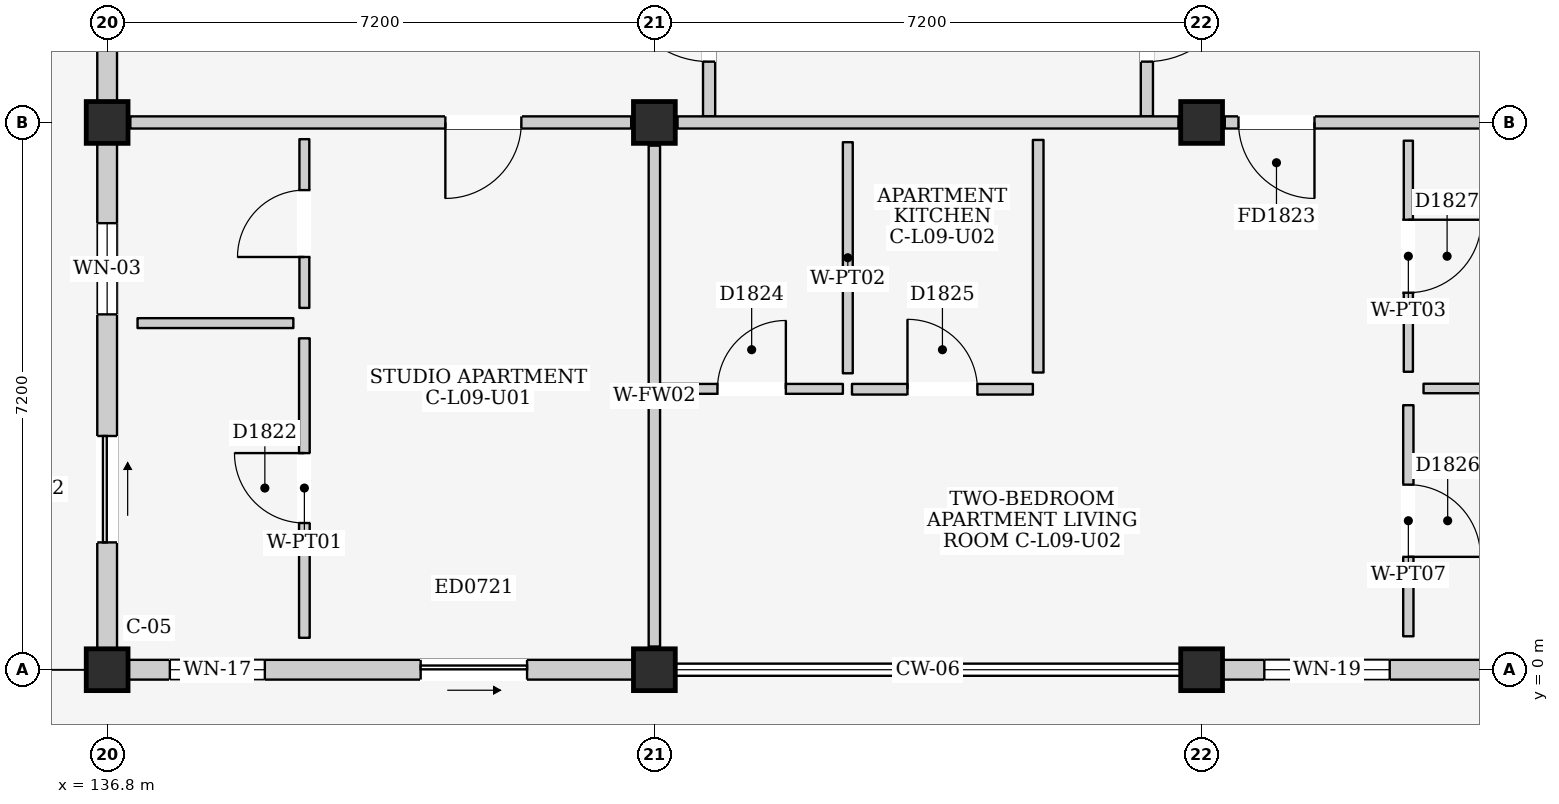
"""IFC4 building model, lengths in metres.
Left out: names, types, materials, properties, quantities, classifications, styles, units other than length and angle.
Written with IfcOpenShell. Run it as: python <this file> out.ifc"""

import sys

from ifc_helpers import new_model, si_unit, direction, frame, frame_2d, origin, origin_2d, place, context, subcontext, project, spatial, rectangle, extrude, element, fill, save


model = new_model("IFC4")
c1 = context("Model", 3, precision=1e-05, world=origin(), true_north=direction((0.0, 1.0)))
c2 = subcontext(c1, "Body", "Model", "MODEL_VIEW")
j1 = project(units=[si_unit("LENGTHUNIT", "METRE"), si_unit("PLANEANGLEUNIT", "RADIAN")], contexts=[c1])
p1 = place(None, origin())
s1 = spatial("IfcSite", under=j1, at=p1, CompositionType="ELEMENT")
p2 = place(p1, origin())
s2 = spatial("IfcBuilding", under=s1, at=p2, CompositionType="ELEMENT")
p3 = place(p2, frame((0.0, 0.0, 31.5)))
s3 = spatial("IfcBuildingStorey", under=s2, at=p3, CompositionType="ELEMENT", Elevation=31.5)
for number, where, z_axis, x_axis in (
    (1, (136.8, 0.0, 0.0), (0.0, 0.0, 1.0), (1.0, 0.0, 0.0)),
    (2, (136.8, 7.2, 0.0), (0.0, 0.0, 1.0), (1.0, 0.0, 0.0)),
    (3, (144.0, 0.0, 0.0), (0.0, 0.0, 1.0), (1.0, 0.0, 0.0)),
    (4, (144.0, 7.2, 0.0), (0.0, 0.0, 1.0), (1.0, 0.0, 0.0)),
    (5, (151.2, 0.0, 0.0), (0.0, 0.0, 1.0), (1.0, 0.0, 0.0)),
    (6, (151.2, 7.2, 0.0), (0.0, 0.0, 1.0), (1.0, 0.0, 0.0)),
):
    element("IfcColumn", number, at=place(p3, frame(where, z_axis=z_axis, x_axis=x_axis)), inside=s3, PredefinedType="COLUMN", context=c2, shape_type="SweptSolid", body=[
        extrude(rectangle(XDim=0.55, YDim=0.55, at=origin_2d()), origin(), (0.0, 0.0, 1.0), 3.3),
    ])
p4 = place(p3, frame((137.075, 0.0, 0.0), z_axis=(0.0, 0.0, 1.0), x_axis=(1.0, 0.0, 0.0)))
e7 = element("IfcWall", 7, at=p4, inside=s3, PredefinedType="ELEMENTEDWALL", context=c2, shape_type="SweptSolid", body=[
    extrude(rectangle(XDim=6.65, YDim=0.26, at=frame_2d((3.325, 0.0))), origin(), (0.0, 0.0, 1.0), 2.615),
])
p5 = place(p4, frame((3.85, 0.0, 0.0)))
e8 = element("IfcOpeningElement", 8, at=p5, cuts=e7, PredefinedType="OPENING", context=c2, shape_type="SweptSolid", body=[
    extrude(rectangle(XDim=1.4, YDim=2.1, at=frame_2d((0.7, 1.05))), frame((0.0, 0.145, 0.0), z_axis=(0.0, -1.0, 0.0), x_axis=(1.0, 0.0, 0.0)), (0.0, 0.0, 1.0), 0.29),
])
p6 = place(p4, frame((0.55, 0.0, 0.9)))
e9 = element("IfcOpeningElement", 9, at=p6, cuts=e7, PredefinedType="OPENING", context=c2, shape_type="SweptSolid", body=[
    extrude(rectangle(XDim=1.25, YDim=1.3, at=frame_2d((0.625, 0.65))), frame((0.0, 0.145, 0.0), z_axis=(0.0, -1.0, 0.0), x_axis=(1.0, 0.0, 0.0)), (0.0, 0.0, 1.0), 0.29),
])
p7 = place(p3, frame((136.8, 0.275, 0.0), z_axis=(0.0, 0.0, 1.0), x_axis=(0.0, 1.0, 0.0)))
e10 = element("IfcWall", 10, at=p7, inside=s3, PredefinedType="ELEMENTEDWALL", context=c2, shape_type="SweptSolid", body=[
    extrude(rectangle(XDim=6.65, YDim=0.26, at=frame_2d((3.325, 0.0))), origin(), (0.0, 0.0, 1.0), 2.565),
])
p8 = place(p7, frame((1.4, 0.0, 0.0)))
e11 = element("IfcOpeningElement", 11, at=p8, cuts=e10, PredefinedType="OPENING", context=c2, shape_type="SweptSolid", body=[
    extrude(rectangle(XDim=1.4, YDim=2.1, at=frame_2d((0.7, 1.05))), frame((0.0, 0.145, 0.0), z_axis=(0.0, -1.0, 0.0), x_axis=(1.0, 0.0, 0.0)), (0.0, 0.0, 1.0), 0.29),
])
p9 = place(p7, frame((4.4, 0.0, 0.95)))
e12 = element("IfcOpeningElement", 12, at=p9, cuts=e10, PredefinedType="OPENING", context=c2, shape_type="SweptSolid", body=[
    extrude(rectangle(XDim=1.2, YDim=1.35, at=frame_2d((0.6, 0.675))), frame((0.0, 0.145, 0.0), z_axis=(0.0, -1.0, 0.0), x_axis=(1.0, 0.0, 0.0)), (0.0, 0.0, 1.0), 0.29),
])
p10 = place(p3, frame((136.8, 7.475, 0.0), z_axis=(0.0, 0.0, 1.0), x_axis=(0.0, 1.0, 0.0)))
e13 = element("IfcWall", 13, at=p10, inside=s3, PredefinedType="ELEMENTEDWALL", context=c2, shape_type="SweptSolid", body=[
    extrude(rectangle(XDim=6.65, YDim=0.26, at=frame_2d((3.325, 0.0))), origin(), (0.0, 0.0, 1.0), 2.565),
])
p11 = place(p10, frame((4.2, 0.0, 1.2)))
e14 = element("IfcOpeningElement", 14, at=p11, cuts=e13, PredefinedType="OPENING", context=c2, shape_type="SweptSolid", body=[
    extrude(rectangle(XDim=1.0, YDim=0.9, at=frame_2d((0.5, 0.45))), frame((0.0, 0.145, 0.0), z_axis=(0.0, -1.0, 0.0), x_axis=(1.0, 0.0, 0.0)), (0.0, 0.0, 1.0), 0.29),
])
p12 = place(p3, frame((151.475, 0.0, 0.0), z_axis=(0.0, 0.0, 1.0), x_axis=(1.0, 0.0, 0.0)))
e15 = element("IfcWall", 15, at=p12, inside=s3, PredefinedType="ELEMENTEDWALL", context=c2, shape_type="SweptSolid", body=[
    extrude(rectangle(XDim=6.65, YDim=0.26, at=frame_2d((3.325, 0.0))), origin(), (0.0, 0.0, 1.0), 2.615),
])
p13 = place(p12, frame((3.85, 0.0, 0.0)))
e16 = element("IfcOpeningElement", 16, at=p13, cuts=e15, PredefinedType="OPENING", context=c2, shape_type="SweptSolid", body=[
    extrude(rectangle(XDim=1.6, YDim=2.12, at=frame_2d((0.8, 1.06))), frame((0.0, 0.145, 0.0), z_axis=(0.0, -1.0, 0.0), x_axis=(1.0, 0.0, 0.0)), (0.0, 0.0, 1.0), 0.29),
])
p14 = place(p12, frame((0.55, 0.0, 0.9)))
e17 = element("IfcOpeningElement", 17, at=p14, cuts=e15, PredefinedType="OPENING", context=c2, shape_type="SweptSolid", body=[
    extrude(rectangle(XDim=1.65, YDim=1.35, at=frame_2d((0.825, 0.675))), frame((0.0, 0.145, 0.0), z_axis=(0.0, -1.0, 0.0), x_axis=(1.0, 0.0, 0.0)), (0.0, 0.0, 1.0), 0.29),
])
p15 = place(p3, frame((144.72, 7.28, 0.0), z_axis=(0.0, 0.0, 1.0), x_axis=(0.0, 1.0, 0.0)))
e18 = element("IfcWall", 18, at=p15, inside=s3, PredefinedType="PARTITIONING", context=c2, shape_type="SweptSolid", body=[
    extrude(rectangle(XDim=4.32, YDim=0.16, at=frame_2d((2.16, 0.0))), origin(), (0.0, 0.0, 1.0), 3.08),
])
p16 = place(p15, frame((0.72, 0.0, 0.0)))
e19 = element("IfcOpeningElement", 19, at=p16, cuts=e18, PredefinedType="OPENING", context=c2, shape_type="SweptSolid", body=[
    extrude(rectangle(XDim=1.2, YDim=2.2, at=frame_2d((0.6, 1.1))), frame((0.0, 0.095, 0.0), z_axis=(0.0, -1.0, 0.0), x_axis=(1.0, 0.0, 0.0)), (0.0, 0.0, 1.0), 0.19),
])
p17 = place(p3, frame((150.48, 7.28, 0.0), z_axis=(0.0, 0.0, 1.0), x_axis=(0.0, 1.0, 0.0)))
e20 = element("IfcWall", 20, at=p17, inside=s3, PredefinedType="PARTITIONING", context=c2, shape_type="SweptSolid", body=[
    extrude(rectangle(XDim=4.32, YDim=0.16, at=frame_2d((2.16, 0.0))), origin(), (0.0, 0.0, 1.0), 3.08),
])
p18 = place(p17, frame((0.72, 0.0, 0.0)))
e21 = element("IfcOpeningElement", 21, at=p18, cuts=e20, PredefinedType="OPENING", context=c2, shape_type="SweptSolid", body=[
    extrude(rectangle(XDim=1.2, YDim=2.2, at=frame_2d((0.6, 1.1))), frame((0.0, 0.095, 0.0), z_axis=(0.0, -1.0, 0.0), x_axis=(1.0, 0.0, 0.0)), (0.0, 0.0, 1.0), 0.19),
])
p19 = place(p3, frame((137.105, 7.2, 0.0), z_axis=(0.0, 0.0, 1.0), x_axis=(1.0, 0.0, 0.0)))
e22 = element("IfcWall", 22, at=p19, inside=s3, PredefinedType="PARTITIONING", context=c2, shape_type="SweptSolid", body=[
    extrude(rectangle(XDim=6.59, YDim=0.16, at=frame_2d((3.295, 0.0))), origin(), (0.0, 0.0, 1.0), 2.465),
])
p20 = place(p19, frame((4.145, 0.0, 0.0)))
e23 = element("IfcOpeningElement", 23, at=p20, cuts=e22, PredefinedType="OPENING", context=c2, shape_type="SweptSolid", body=[
    extrude(rectangle(XDim=1.0, YDim=2.15, at=frame_2d((0.5, 1.075))), frame((0.0, 0.095, 0.0), z_axis=(0.0, -1.0, 0.0), x_axis=(1.0, 0.0, 0.0)), (0.0, 0.0, 1.0), 0.19),
])
p21 = place(p3, frame((144.0, 0.305, 0.0), z_axis=(0.0, 0.0, 1.0), x_axis=(0.0, 1.0, 0.0)))
e24 = element("IfcWall", 24, at=p21, inside=s3, PredefinedType="PARTITIONING", context=c2, shape_type="SweptSolid", body=[
    extrude(rectangle(XDim=6.59, YDim=0.15, at=frame_2d((3.295, 0.0))), origin(), (0.0, 0.0, 1.0), 2.565),
])
p22 = place(p3, frame((137.2, 4.56, 0.0), z_axis=(0.0, 0.0, 1.0), x_axis=(1.0, 0.0, 0.0)))
e25 = element("IfcWall", 25, at=p22, inside=s3, PredefinedType="PARTITIONING", context=c2, shape_type="SweptSolid", body=[
    extrude(rectangle(XDim=2.05, YDim=0.13, at=frame_2d((1.025, 0.0))), origin(), (0.0, 0.0, 1.0), 3.08),
])
p23 = place(p3, frame((139.395, 4.76, 0.0), z_axis=(0.0, 0.0, 1.0), x_axis=(0.0, 1.0, 0.0)))
e26 = element("IfcWall", 26, at=p23, inside=s3, PredefinedType="PARTITIONING", context=c2, shape_type="SweptSolid", body=[
    extrude(rectangle(XDim=2.22, YDim=0.13, at=frame_2d((1.11, 0.0))), origin(), (0.0, 0.0, 1.0), 3.08),
])
p24 = place(p23, frame((0.67, 0.0, 0.0)))
e27 = element("IfcOpeningElement", 27, at=p24, cuts=e26, PredefinedType="OPENING", context=c2, shape_type="SweptSolid", body=[
    extrude(rectangle(XDim=0.88, YDim=2.1, at=frame_2d((0.44, 1.05))), frame((0.0, 0.08, 0.0), z_axis=(0.0, -1.0, 0.0), x_axis=(1.0, 0.0, 0.0)), (0.0, 0.0, 1.0), 0.16),
])
p25 = place(p3, frame((139.395, 0.42, 0.0), z_axis=(0.0, 0.0, 1.0), x_axis=(0.0, 1.0, 0.0)))
e28 = element("IfcWall", 28, at=p25, inside=s3, PredefinedType="PARTITIONING", context=c2, shape_type="SweptSolid", body=[
    extrude(rectangle(XDim=3.94, YDim=0.14, at=frame_2d((1.97, 0.0))), origin(), (0.0, 0.0, 1.0), 3.08),
])
p26 = place(p25, frame((1.51, 0.0, 0.0)))
e29 = element("IfcOpeningElement", 29, at=p26, cuts=e28, PredefinedType="OPENING", context=c2, shape_type="SweptSolid", body=[
    extrude(rectangle(XDim=0.92, YDim=2.1, at=frame_2d((0.46, 1.05))), frame((0.0, 0.085, 0.0), z_axis=(0.0, -1.0, 0.0), x_axis=(1.0, 0.0, 0.0)), (0.0, 0.0, 1.0), 0.17),
])
p27 = place(p3, frame((144.305, 7.2, 0.0), z_axis=(0.0, 0.0, 1.0), x_axis=(1.0, 0.0, 0.0)))
e30 = element("IfcWall", 30, at=p27, inside=s3, PredefinedType="PARTITIONING", context=c2, shape_type="SweptSolid", body=[
    extrude(rectangle(XDim=6.59, YDim=0.16, at=frame_2d((3.295, 0.0))), origin(), (0.0, 0.0, 1.0), 2.465),
])
p28 = place(p3, frame((151.505, 7.2, 0.0), z_axis=(0.0, 0.0, 1.0), x_axis=(1.0, 0.0, 0.0)))
e31 = element("IfcWall", 31, at=p28, inside=s3, PredefinedType="PARTITIONING", context=c2, shape_type="SweptSolid", body=[
    extrude(rectangle(XDim=6.59, YDim=0.16, at=frame_2d((3.295, 0.0))), origin(), (0.0, 0.0, 1.0), 2.465),
])
p29 = place(p28, frame((0.18, 0.0, 0.0)))
e32 = element("IfcOpeningElement", 32, at=p29, cuts=e31, PredefinedType="OPENING", context=c2, shape_type="SweptSolid", body=[
    extrude(rectangle(XDim=1.0, YDim=2.15, at=frame_2d((0.5, 1.075))), frame((0.0, 0.095, 0.0), z_axis=(0.0, -1.0, 0.0), x_axis=(1.0, 0.0, 0.0)), (0.0, 0.0, 1.0), 0.19),
])
p30 = place(p3, frame((144.08, 3.695, 0.0), z_axis=(0.0, 0.0, 1.0), x_axis=(1.0, 0.0, 0.0)))
e33 = element("IfcWall", 33, at=p30, inside=s3, PredefinedType="PARTITIONING", context=c2, shape_type="SweptSolid", body=[
    extrude(rectangle(XDim=2.4, YDim=0.13, at=frame_2d((1.2, 0.0))), origin(), (0.0, 0.0, 1.0), 3.08),
])
p31 = place(p30, frame((0.75, 0.0, 0.0)))
e34 = element("IfcOpeningElement", 34, at=p31, cuts=e33, PredefinedType="OPENING", context=c2, shape_type="SweptSolid", body=[
    extrude(rectangle(XDim=0.9, YDim=2.1, at=frame_2d((0.45, 1.05))), frame((0.0, 0.08, 0.0), z_axis=(0.0, -1.0, 0.0), x_axis=(1.0, 0.0, 0.0)), (0.0, 0.0, 1.0), 0.16),
])
p32 = place(p3, frame((146.545, 3.9, 0.0), z_axis=(0.0, 0.0, 1.0), x_axis=(0.0, 1.0, 0.0)))
e35 = element("IfcWall", 35, at=p32, inside=s3, PredefinedType="PARTITIONING", context=c2, shape_type="SweptSolid", body=[
    extrude(rectangle(XDim=3.04, YDim=0.13, at=frame_2d((1.52, 0.0))), origin(), (0.0, 0.0, 1.0), 3.08),
])
p33 = place(p3, frame((146.6, 3.69, 0.0), z_axis=(0.0, 0.0, 1.0), x_axis=(1.0, 0.0, 0.0)))
e36 = element("IfcWall", 36, at=p33, inside=s3, PredefinedType="PARTITIONING", context=c2, shape_type="SweptSolid", body=[
    extrude(rectangle(XDim=2.38, YDim=0.14, at=frame_2d((1.19, 0.0))), origin(), (0.0, 0.0, 1.0), 3.08),
])
p34 = place(p33, frame((0.73, 0.0, 0.0)))
e37 = element("IfcOpeningElement", 37, at=p34, cuts=e36, PredefinedType="OPENING", context=c2, shape_type="SweptSolid", body=[
    extrude(rectangle(XDim=0.92, YDim=2.1, at=frame_2d((0.46, 1.05))), frame((0.0, 0.085, 0.0), z_axis=(0.0, -1.0, 0.0), x_axis=(1.0, 0.0, 0.0)), (0.0, 0.0, 1.0), 0.17),
])
p35 = place(p3, frame((149.05, 3.91, 0.0), z_axis=(0.0, 0.0, 1.0), x_axis=(0.0, 1.0, 0.0)))
e38 = element("IfcWall", 38, at=p35, inside=s3, PredefinedType="PARTITIONING", context=c2, shape_type="SweptSolid", body=[
    extrude(rectangle(XDim=3.06, YDim=0.14, at=frame_2d((1.53, 0.0))), origin(), (0.0, 0.0, 1.0), 3.08),
])
p36 = place(p3, frame((153.92, 0.44, 0.0), z_axis=(0.0, 0.0, 1.0), x_axis=(0.0, 1.0, 0.0)))
e39 = element("IfcWall", 39, at=p36, inside=s3, PredefinedType="PARTITIONING", context=c2, shape_type="SweptSolid", body=[
    extrude(rectangle(XDim=3.04, YDim=0.135, at=frame_2d((1.52, 0.0))), origin(), (0.0, 0.0, 1.0), 3.08),
])
p37 = place(p36, frame((1.045, 0.0, 0.0)))
e40 = element("IfcOpeningElement", 40, at=p37, cuts=e39, PredefinedType="OPENING", context=c2, shape_type="SweptSolid", body=[
    extrude(rectangle(XDim=0.95, YDim=2.15, at=frame_2d((0.475, 1.075))), frame((0.0, 0.083, 0.0), z_axis=(0.0, -1.0, 0.0), x_axis=(1.0, 0.0, 0.0)), (0.0, 0.0, 1.0), 0.165),
])
p38 = place(p3, frame((154.12, 3.7, 0.0), z_axis=(0.0, 0.0, 1.0), x_axis=(1.0, 0.0, 0.0)))
e41 = element("IfcWall", 41, at=p38, inside=s3, PredefinedType="PARTITIONING", context=c2, shape_type="SweptSolid", body=[
    extrude(rectangle(XDim=4.06, YDim=0.125, at=frame_2d((2.03, 0.0))), origin(), (0.0, 0.0, 1.0), 3.08),
])
p39 = place(p3, frame((153.92, 3.92, 0.0), z_axis=(0.0, 0.0, 1.0), x_axis=(0.0, 1.0, 0.0)))
e42 = element("IfcWall", 42, at=p39, inside=s3, PredefinedType="PARTITIONING", context=c2, shape_type="SweptSolid", body=[
    extrude(rectangle(XDim=3.04, YDim=0.12, at=frame_2d((1.52, 0.0))), origin(), (0.0, 0.0, 1.0), 3.08),
])
p40 = place(p39, frame((1.04, 0.0, 0.0)))
e43 = element("IfcOpeningElement", 43, at=p40, cuts=e42, PredefinedType="OPENING", context=c2, shape_type="SweptSolid", body=[
    extrude(rectangle(XDim=0.96, YDim=2.15, at=frame_2d((0.48, 1.075))), frame((0.0, 0.075, 0.0), z_axis=(0.0, -1.0, 0.0), x_axis=(1.0, 0.0, 0.0)), (0.0, 0.0, 1.0), 0.15),
])
p41 = place(p5, frame((1.4, 0.0, 0.0), z_axis=(0.0, 0.0, 1.0), x_axis=(-1.0, 0.0, 0.0)))
e44 = element("IfcDoor", 44, at=p41, inside=s3, OperationType="SLIDING_TO_RIGHT", PredefinedType="DOOR", context=c2, shape_type="SweptSolid", body=[
    extrude(rectangle(XDim=1.4, YDim=2.1, at=frame_2d((0.7, 1.05))), frame((0.0, 0.025, 0.0), z_axis=(0.0, -1.0, 0.0), x_axis=(1.0, 0.0, 0.0)), (0.0, 0.0, 1.0), 0.05),
])
fill(e8, e44)
p42 = place(p6, origin())
e45 = element("IfcWindow", 45, at=p42, inside=s3, PartitioningType="SINGLE_PANEL", PredefinedType="WINDOW", context=c2, shape_type="SweptSolid", body=[
    extrude(rectangle(XDim=1.25, YDim=1.3, at=frame_2d((0.625, 0.65))), frame((0.0, 0.03, 0.0), z_axis=(0.0, -1.0, 0.0), x_axis=(1.0, 0.0, 0.0)), (0.0, 0.0, 1.0), 0.06),
])
fill(e9, e45)
p43 = place(p8, frame((1.4, 0.0, 0.0), z_axis=(0.0, 0.0, 1.0), x_axis=(-1.0, 0.0, 0.0)))
e46 = element("IfcDoor", 46, at=p43, inside=s3, OperationType="SLIDING_TO_RIGHT", PredefinedType="DOOR", context=c2, shape_type="SweptSolid", body=[
    extrude(rectangle(XDim=1.4, YDim=2.1, at=frame_2d((0.7, 1.05))), frame((0.0, 0.025, 0.0), z_axis=(0.0, -1.0, 0.0), x_axis=(1.0, 0.0, 0.0)), (0.0, 0.0, 1.0), 0.05),
])
fill(e11, e46)
p44 = place(p9, origin())
e47 = element("IfcWindow", 47, at=p44, inside=s3, PartitioningType="SINGLE_PANEL", PredefinedType="WINDOW", context=c2, shape_type="SweptSolid", body=[
    extrude(rectangle(XDim=1.2, YDim=1.35, at=frame_2d((0.6, 0.675))), frame((0.0, 0.03, 0.0), z_axis=(0.0, -1.0, 0.0), x_axis=(1.0, 0.0, 0.0)), (0.0, 0.0, 1.0), 0.06),
])
fill(e12, e47)
p45 = place(p14, origin())
e48 = element("IfcWindow", 48, at=p45, inside=s3, PartitioningType="DOUBLE_PANEL_VERTICAL", PredefinedType="WINDOW", context=c2, shape_type="SweptSolid", body=[
    extrude(rectangle(XDim=1.65, YDim=1.35, at=frame_2d((0.825, 0.675))), frame((0.0, 0.03, 0.0), z_axis=(0.0, -1.0, 0.0), x_axis=(1.0, 0.0, 0.0)), (0.0, 0.0, 1.0), 0.06),
])
fill(e17, e48)
p46 = place(p16, origin())
e49 = element("IfcDoor", 49, at=p46, inside=s3, OperationType="SINGLE_SWING_RIGHT", PredefinedType="DOOR", context=c2, shape_type="SweptSolid", body=[
    extrude(rectangle(XDim=1.2, YDim=2.2, at=frame_2d((0.6, 1.1))), frame((0.0, 0.025, 0.0), z_axis=(0.0, -1.0, 0.0), x_axis=(1.0, 0.0, 0.0)), (0.0, 0.0, 1.0), 0.05),
])
fill(e19, e49)
p47 = place(p18, frame((1.2, 0.0, 0.0), z_axis=(0.0, 0.0, 1.0), x_axis=(-1.0, 0.0, 0.0)))
e50 = element("IfcDoor", 50, at=p47, inside=s3, OperationType="SINGLE_SWING_LEFT", PredefinedType="DOOR", context=c2, shape_type="SweptSolid", body=[
    extrude(rectangle(XDim=1.2, YDim=2.2, at=frame_2d((0.6, 1.1))), frame((0.0, 0.025, 0.0), z_axis=(0.0, -1.0, 0.0), x_axis=(1.0, 0.0, 0.0)), (0.0, 0.0, 1.0), 0.05),
])
fill(e21, e50)
p48 = place(p20, frame((1.0, 0.0, 0.0), z_axis=(0.0, 0.0, 1.0), x_axis=(-1.0, 0.0, 0.0)))
e51 = element("IfcDoor", 51, at=p48, inside=s3, OperationType="SINGLE_SWING_RIGHT", PredefinedType="DOOR", context=c2, shape_type="SweptSolid", body=[
    extrude(rectangle(XDim=1.0, YDim=2.15, at=frame_2d((0.5, 1.075))), frame((0.0, 0.025, 0.0), z_axis=(0.0, -1.0, 0.0), x_axis=(1.0, 0.0, 0.0)), (0.0, 0.0, 1.0), 0.05),
])
fill(e23, e51)
p49 = place(p24, origin())
e52 = element("IfcDoor", 52, at=p49, inside=s3, OperationType="SINGLE_SWING_LEFT", PredefinedType="DOOR", context=c2, shape_type="SweptSolid", body=[
    extrude(rectangle(XDim=0.88, YDim=2.1, at=frame_2d((0.44, 1.05))), frame((0.0, 0.025, 0.0), z_axis=(0.0, -1.0, 0.0), x_axis=(1.0, 0.0, 0.0)), (0.0, 0.0, 1.0), 0.05),
])
fill(e27, e52)
p50 = place(p26, origin())
e53 = element("IfcDoor", 53, at=p50, inside=s3, OperationType="SINGLE_SWING_RIGHT", PredefinedType="DOOR", context=c2, shape_type="SweptSolid", body=[
    extrude(rectangle(XDim=0.92, YDim=2.1, at=frame_2d((0.46, 1.05))), frame((0.0, 0.025, 0.0), z_axis=(0.0, -1.0, 0.0), x_axis=(1.0, 0.0, 0.0)), (0.0, 0.0, 1.0), 0.05),
])
fill(e29, e53)
p51 = place(p29, frame((1.0, 0.0, 0.0), z_axis=(0.0, 0.0, 1.0), x_axis=(-1.0, 0.0, 0.0)))
e54 = element("IfcDoor", 54, at=p51, inside=s3, OperationType="SINGLE_SWING_LEFT", PredefinedType="DOOR", context=c2, shape_type="SweptSolid", body=[
    extrude(rectangle(XDim=1.0, YDim=2.15, at=frame_2d((0.5, 1.075))), frame((0.0, 0.025, 0.0), z_axis=(0.0, -1.0, 0.0), x_axis=(1.0, 0.0, 0.0)), (0.0, 0.0, 1.0), 0.05),
])
fill(e32, e54)
p52 = place(p31, origin())
e55 = element("IfcDoor", 55, at=p52, inside=s3, OperationType="SINGLE_SWING_RIGHT", PredefinedType="DOOR", context=c2, shape_type="SweptSolid", body=[
    extrude(rectangle(XDim=0.9, YDim=2.1, at=frame_2d((0.45, 1.05))), frame((0.0, 0.025, 0.0), z_axis=(0.0, -1.0, 0.0), x_axis=(1.0, 0.0, 0.0)), (0.0, 0.0, 1.0), 0.05),
])
fill(e34, e55)
p53 = place(p34, origin())
e56 = element("IfcDoor", 56, at=p53, inside=s3, OperationType="SINGLE_SWING_LEFT", PredefinedType="DOOR", context=c2, shape_type="SweptSolid", body=[
    extrude(rectangle(XDim=0.92, YDim=2.1, at=frame_2d((0.46, 1.05))), frame((0.0, 0.025, 0.0), z_axis=(0.0, -1.0, 0.0), x_axis=(1.0, 0.0, 0.0)), (0.0, 0.0, 1.0), 0.05),
])
fill(e37, e56)
p54 = place(p37, frame((0.95, 0.0, 0.0), z_axis=(0.0, 0.0, 1.0), x_axis=(-1.0, 0.0, 0.0)))
e57 = element("IfcDoor", 57, at=p54, inside=s3, OperationType="SINGLE_SWING_RIGHT", PredefinedType="DOOR", context=c2, shape_type="SweptSolid", body=[
    extrude(rectangle(XDim=0.95, YDim=2.15, at=frame_2d((0.475, 1.075))), frame((0.0, 0.025, 0.0), z_axis=(0.0, -1.0, 0.0), x_axis=(1.0, 0.0, 0.0)), (0.0, 0.0, 1.0), 0.05),
])
fill(e40, e57)
p55 = place(p40, frame((0.96, 0.0, 0.0), z_axis=(0.0, 0.0, 1.0), x_axis=(-1.0, 0.0, 0.0)))
e58 = element("IfcDoor", 58, at=p55, inside=s3, OperationType="SINGLE_SWING_LEFT", PredefinedType="DOOR", context=c2, shape_type="SweptSolid", body=[
    extrude(rectangle(XDim=0.96, YDim=2.15, at=frame_2d((0.48, 1.075))), frame((0.0, 0.025, 0.0), z_axis=(0.0, -1.0, 0.0), x_axis=(1.0, 0.0, 0.0)), (0.0, 0.0, 1.0), 0.05),
])
fill(e43, e58)
save(model, sys.argv[1])
